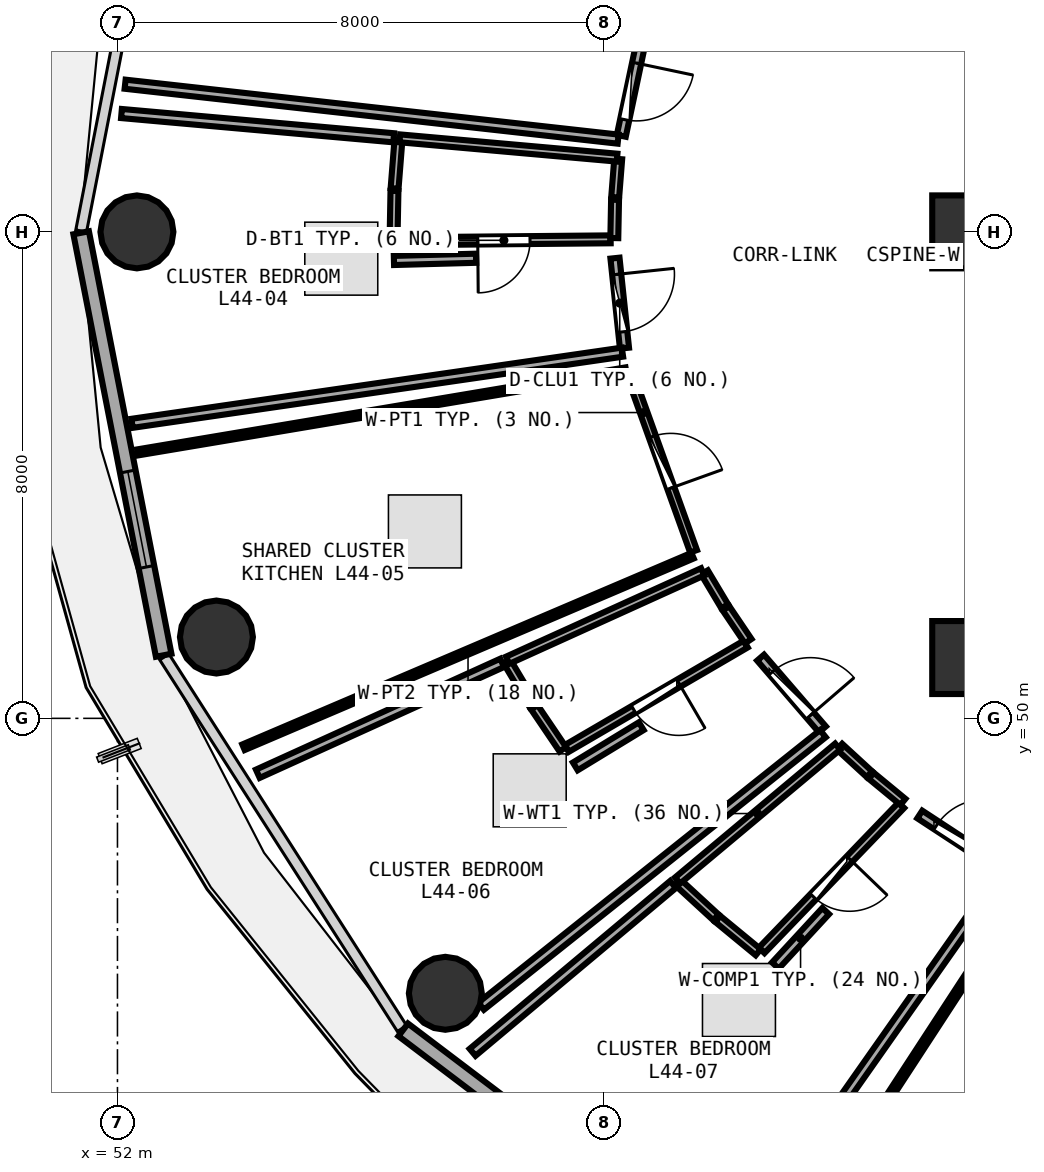
"""IFC4 building model, lengths in metres.
Left out: names, types, materials, properties, quantities, classifications, styles, units other than length and angle.
Written with IfcOpenShell. Run it as: python <this file> out.ifc"""

import sys

from ifc_helpers import new_model, si_unit, direction, frame, frame_2d, origin, origin_2d, place, context, subcontext, project, spatial, rectangle, circle, extrude, element, fill, save


model = new_model("IFC4")
c1 = context("Model", 3, precision=1e-05, world=origin(), true_north=direction((0.0, 1.0)))
c2 = subcontext(c1, "Body", "Model", "MODEL_VIEW")
j1 = project(units=[si_unit("LENGTHUNIT", "METRE"), si_unit("PLANEANGLEUNIT", "RADIAN")], contexts=[c1])
p1 = place(None, origin())
s1 = spatial("IfcSite", under=j1, at=p1, CompositionType="ELEMENT")
p2 = place(p1, origin())
s2 = spatial("IfcBuilding", under=s1, at=p2, CompositionType="ELEMENT")
p3 = place(p2, frame((0.0, 0.0, 173.1)))
s3 = spatial("IfcBuildingStorey", under=s2, at=p3, CompositionType="ELEMENT", Elevation=173.1)
for number, where, z_axis, x_axis in (
    (1, (66.0, 51.0, 0.0), (0.0, 0.0, 1.0), (1.0, 0.0, 0.0)),
    (2, (66.0, 58.0, 0.0), (0.0, 0.0, 1.0), (1.0, 0.0, 0.0)),
):
    element("IfcColumn", number, at=place(p3, frame(where, z_axis=z_axis, x_axis=x_axis)), inside=s3, PredefinedType="PILASTER", context=c2, shape_type="SweptSolid", body=[
        extrude(rectangle(XDim=1.2, YDim=1.2, at=origin_2d()), origin(), (0.0, 0.0, 1.0), 3.75),
    ])
for number, where, z_axis, x_axis in (
    (3, (52.32, 58.0, 0.0), (0.0, 0.0, 1.0), (1.0, 0.0, 0.0)),
    (4, (53.627, 51.337, 0.0), (0.0, 0.0, 1.0), (1.0, 0.0, 0.0)),
    (5, (57.392, 45.479, 0.0), (0.0, 0.0, 1.0), (1.0, 0.0, 0.0)),
):
    element("IfcColumn", number, at=place(p3, frame(where, z_axis=z_axis, x_axis=x_axis)), inside=s3, PredefinedType="COLUMN", context=c2, shape_type="SweptSolid", body=[
        extrude(circle(Radius=0.6, at=origin_2d()), origin(), (0.0, 0.0, 1.0), 3.75),
    ])
p4 = place(p3, frame((51.403, 57.985, 0.0), z_axis=(0.0, 0.0, 1.0), x_axis=(0.191716984769, -0.981450252306, 0.0)))
e6 = element("IfcWall", 6, at=p4, inside=s3, PredefinedType="SOLIDWALL", context=c2, shape_type="SweptSolid", body=[
    extrude(rectangle(XDim=7.079, YDim=0.26, at=frame_2d((3.54, 0.0))), origin(), (0.0, 0.0, 1.0), 3.475),
])
p5 = place(p4, frame((4.0, 0.0, 0.85)))
e7 = element("IfcOpeningElement", 7, at=p5, cuts=e6, PredefinedType="OPENING", context=c2, shape_type="SweptSolid", body=[
    extrude(rectangle(XDim=1.6, YDim=1.45, at=frame_2d((0.8, 0.725))), frame((0.0, 0.14, 0.0), z_axis=(0.0, -1.0, 0.0), x_axis=(1.0, 0.0, 0.0)), (0.0, 0.0, 1.0), 0.28),
])
p6 = place(p3, frame((56.699, 44.878, 0.0), z_axis=(0.0, 0.0, 1.0), x_axis=(0.797163719609, -0.603763202042, 0.0)))
e8 = element("IfcWall", 8, at=p6, inside=s3, PredefinedType="SOLIDWALL", context=c2, shape_type="SweptSolid", body=[
    extrude(rectangle(XDim=7.512, YDim=0.26, at=frame_2d((3.756, 0.0))), origin(), (0.0, 0.0, 1.0), 3.475),
])
p7 = place(p6, frame((2.956, 0.0, 0.85)))
e9 = element("IfcOpeningElement", 9, at=p7, cuts=e8, PredefinedType="OPENING", context=c2, shape_type="SweptSolid", body=[
    extrude(rectangle(XDim=1.6, YDim=1.45, at=frame_2d((0.8, 0.725))), frame((0.0, 0.14, 0.0), z_axis=(0.0, -1.0, 0.0), x_axis=(1.0, 0.0, 0.0)), (0.0, 0.0, 1.0), 0.28),
])
p8 = place(p3, frame((60.594, 61.041, 0.0), z_axis=(0.0, 0.0, 1.0), x_axis=(-0.206257580925, -0.978497731378, 0.0)))
e10 = element("IfcWall", 10, at=p8, inside=s3, PredefinedType="PARTITIONING", context=c2, shape_type="SweptSolid", body=[
    extrude(rectangle(XDim=1.494, YDim=0.15, at=frame_2d((0.747, 0.0))), origin(), (0.0, 0.0, 1.0), 3.48),
])
p9 = place(p8, frame((0.272, 0.0, 0.0)))
e11 = element("IfcOpeningElement", 11, at=p9, cuts=e10, PredefinedType="OPENING", context=c2, shape_type="SweptSolid", body=[
    extrude(rectangle(XDim=0.95, YDim=2.08, at=frame_2d((0.475, 1.04))), frame((0.0, 0.085, 0.0), z_axis=(0.0, -1.0, 0.0), x_axis=(1.0, 0.0, 0.0)), (0.0, 0.0, 1.0), 0.17),
])
p10 = place(p3, frame((60.111, 57.877, 0.0), z_axis=(0.0, 0.0, 1.0), x_axis=(-0.999958513443, -0.009108863449, 0.0)))
e12 = element("IfcWall", 12, at=p10, inside=s3, PredefinedType="PLUMBINGWALL", context=c2, shape_type="SweptSolid", body=[
    extrude(rectangle(XDim=3.511, YDim=0.13, at=frame_2d((1.756, 0.0))), origin(), (0.0, 0.0, 1.0), 2.975),
])
p11 = place(p10, frame((1.326, 0.0, 0.0)))
e13 = element("IfcOpeningElement", 13, at=p11, cuts=e12, PredefinedType="OPENING", context=c2, shape_type="SweptSolid", body=[
    extrude(rectangle(XDim=0.86, YDim=2.05, at=frame_2d((0.43, 1.025))), frame((0.0, 0.075, 0.0), z_axis=(0.0, -1.0, 0.0), x_axis=(1.0, 0.0, 0.0)), (0.0, 0.0, 1.0), 0.15),
])
p12 = place(p3, frame((60.182, 57.568, 0.0), z_axis=(0.0, 0.0, 1.0), x_axis=(0.104940843895, -0.994478465972, 0.0)))
e14 = element("IfcWall", 14, at=p12, inside=s3, PredefinedType="PARTITIONING", context=c2, shape_type="SweptSolid", body=[
    extrude(rectangle(XDim=1.489, YDim=0.15, at=frame_2d((0.745, 0.0))), origin(), (0.0, 0.0, 1.0), 3.48),
])
p13 = place(p12, frame((0.269, 0.0, 0.0)))
e15 = element("IfcOpeningElement", 15, at=p13, cuts=e14, PredefinedType="OPENING", context=c2, shape_type="SweptSolid", body=[
    extrude(rectangle(XDim=0.95, YDim=2.08, at=frame_2d((0.475, 1.04))), frame((0.0, 0.085, 0.0), z_axis=(0.0, -1.0, 0.0), x_axis=(1.0, 0.0, 0.0)), (0.0, 0.0, 1.0), 0.17),
])
p14 = place(p3, frame((60.423, 55.673, 0.0), z_axis=(0.0, 0.0, 1.0), x_axis=(0.338221551274, -0.941066513193, 0.0)))
e16 = element("IfcWall", 16, at=p14, inside=s3, PredefinedType="PARTITIONING", context=c2, shape_type="SweptSolid", body=[
    extrude(rectangle(XDim=3.108, YDim=0.12, at=frame_2d((1.554, 0.0))), origin(), (0.0, 0.0, 1.0), 3.235),
])
p15 = place(p14, frame((1.104, 0.0, 0.0)))
e17 = element("IfcOpeningElement", 17, at=p15, cuts=e16, PredefinedType="OPENING", context=c2, shape_type="SweptSolid", body=[
    extrude(rectangle(XDim=0.9, YDim=2.08, at=frame_2d((0.45, 1.04))), frame((0.0, 0.07, 0.0), z_axis=(0.0, -1.0, 0.0), x_axis=(1.0, 0.0, 0.0)), (0.0, 0.0, 1.0), 0.14),
])
p16 = place(p3, frame((62.333, 51.222, 0.0), z_axis=(0.0, 0.0, 1.0), x_axis=(-0.863869779697, -0.503715201008, 0.0)))
e18 = element("IfcWall", 18, at=p16, inside=s3, PredefinedType="PLUMBINGWALL", context=c2, shape_type="SweptSolid", body=[
    extrude(rectangle(XDim=3.41, YDim=0.13, at=frame_2d((1.705, 0.0))), origin(), (0.0, 0.0, 1.0), 2.975),
])
p17 = place(p16, frame((1.275, 0.0, 0.0)))
e19 = element("IfcOpeningElement", 19, at=p17, cuts=e18, PredefinedType="OPENING", context=c2, shape_type="SweptSolid", body=[
    extrude(rectangle(XDim=0.86, YDim=2.05, at=frame_2d((0.43, 1.025))), frame((0.0, 0.075, 0.0), z_axis=(0.0, -1.0, 0.0), x_axis=(1.0, 0.0, 0.0)), (0.0, 0.0, 1.0), 0.15),
])
p18 = place(p3, frame((62.577, 50.999, 0.0), z_axis=(0.0, 0.0, 1.0), x_axis=(0.652725635782, -0.757594379859, 0.0)))
e20 = element("IfcWall", 20, at=p18, inside=s3, PredefinedType="PARTITIONING", context=c2, shape_type="SweptSolid", body=[
    extrude(rectangle(XDim=1.557, YDim=0.15, at=frame_2d((0.779, 0.0))), origin(), (0.0, 0.0, 1.0), 2.975),
])
p19 = place(p18, frame((0.304, 0.0, 0.0)))
e21 = element("IfcOpeningElement", 21, at=p19, cuts=e20, PredefinedType="OPENING", context=c2, shape_type="SweptSolid", body=[
    extrude(rectangle(XDim=0.95, YDim=2.08, at=frame_2d((0.475, 1.04))), frame((0.0, 0.085, 0.0), z_axis=(0.0, -1.0, 0.0), x_axis=(1.0, 0.0, 0.0)), (0.0, 0.0, 1.0), 0.17),
])
p20 = place(p3, frame((64.891, 48.571, 0.0), z_axis=(0.0, 0.0, 1.0), x_axis=(-0.69341503006, -0.720538407086, 0.0)))
e22 = element("IfcWall", 22, at=p20, inside=s3, PredefinedType="PLUMBINGWALL", context=c2, shape_type="SweptSolid", body=[
    extrude(rectangle(XDim=3.312, YDim=0.13, at=frame_2d((1.656, 0.0))), origin(), (0.0, 0.0, 1.0), 3.175),
])
p21 = place(p20, frame((1.226, 0.0, 0.0)))
e23 = element("IfcOpeningElement", 23, at=p21, cuts=e22, PredefinedType="OPENING", context=c2, shape_type="SweptSolid", body=[
    extrude(rectangle(XDim=0.86, YDim=2.05, at=frame_2d((0.43, 1.025))), frame((0.0, 0.075, 0.0), z_axis=(0.0, -1.0, 0.0), x_axis=(1.0, 0.0, 0.0)), (0.0, 0.0, 1.0), 0.15),
])
p22 = place(p3, frame((65.195, 48.419, 0.0), z_axis=(0.0, 0.0, 1.0), x_axis=(0.836324272787, -0.548235087118, 0.0)))
e24 = element("IfcWall", 24, at=p22, inside=s3, PredefinedType="PARTITIONING", context=c2, shape_type="SweptSolid", body=[
    extrude(rectangle(XDim=1.608, YDim=0.15, at=frame_2d((0.804, 0.0))), origin(), (0.0, 0.0, 1.0), 2.975),
])
p23 = place(p22, frame((0.329, 0.0, 0.0)))
e25 = element("IfcOpeningElement", 25, at=p23, cuts=e24, PredefinedType="OPENING", context=c2, shape_type="SweptSolid", body=[
    extrude(rectangle(XDim=0.95, YDim=2.08, at=frame_2d((0.475, 1.04))), frame((0.0, 0.085, 0.0), z_axis=(0.0, -1.0, 0.0), x_axis=(1.0, 0.0, 0.0)), (0.0, 0.0, 1.0), 0.17),
])
p24 = place(p3, frame((63.351, 41.725, 0.0), z_axis=(0.0, 0.0, 1.0), x_axis=(0.546294843463, 0.837592946487, 0.0)))
e26 = element("IfcWall", 26, at=p24, inside=s3, PredefinedType="PARTITIONING", context=c2, shape_type="SweptSolid", body=[
    extrude(rectangle(XDim=6.604, YDim=0.1, at=frame_2d((3.302, 0.0))), origin(), (0.0, 0.0, 1.0), 2.975),
])
p25 = place(p3, frame((60.234, 59.525, 0.0), z_axis=(0.0, 0.0, 1.0), x_axis=(-0.99385157858, 0.110720548017, 0.0)))
e27 = element("IfcWall", 27, at=p25, inside=s3, PredefinedType="PARTITIONING", context=c2, shape_type="SweptSolid", body=[
    extrude(rectangle(XDim=8.158, YDim=0.15, at=frame_2d((4.079, 0.0))), origin(), (0.0, 0.0, 1.0), 3.025),
])
p26 = place(p3, frame((60.235, 59.199, 0.0), z_axis=(0.0, 0.0, 1.0), x_axis=(-0.078763069799, -0.996893363824, 0.0)))
e28 = element("IfcWall", 28, at=p26, inside=s3, PredefinedType="PLUMBINGWALL", context=c2, shape_type="SweptSolid", body=[
    extrude(rectangle(XDim=0.632, YDim=0.13, at=frame_2d((0.316, 0.0))), origin(), (0.0, 0.0, 1.0), 3.48),
])
p27 = place(p3, frame((60.184, 58.529, 0.0), z_axis=(0.0, 0.0, 1.0), x_axis=(-0.019338742534, -0.999812989032, 0.0)))
e29 = element("IfcWall", 29, at=p27, inside=s3, PredefinedType="PLUMBINGWALL", context=c2, shape_type="SweptSolid", body=[
    extrude(rectangle(XDim=0.631, YDim=0.13, at=frame_2d((0.315, 0.0))), origin(), (0.0, 0.0, 1.0), 2.975),
])
p28 = place(p3, frame((56.54, 57.865, 0.0), z_axis=(0.0, 0.0, 1.0), x_axis=(0.019006825377, 0.999819353978, 0.0)))
e30 = element("IfcWall", 30, at=p28, inside=s3, PredefinedType="PLUMBINGWALL", context=c2, shape_type="SweptSolid", body=[
    extrude(rectangle(XDim=0.809, YDim=0.13, at=frame_2d((0.405, 0.0))), origin(), (0.0, 0.0, 1.0), 2.975),
])
p29 = place(p3, frame((56.558, 58.714, 0.0), z_axis=(0.0, 0.0, 1.0), x_axis=(0.078797232985, 0.996890664052, 0.0)))
e31 = element("IfcWall", 31, at=p29, inside=s3, PredefinedType="PLUMBINGWALL", context=c2, shape_type="SweptSolid", body=[
    extrude(rectangle(XDim=0.809, YDim=0.13, at=frame_2d((0.404, 0.0))), origin(), (0.0, 0.0, 1.0), 3.48),
])
p30 = place(p3, frame((56.643, 59.538, 0.0), z_axis=(0.0, 0.0, 1.0), x_axis=(0.99608063721, -0.088449783359, 0.0)))
e32 = element("IfcWall", 32, at=p30, inside=s3, PredefinedType="PLUMBINGWALL", context=c2, shape_type="SweptSolid", body=[
    extrude(rectangle(XDim=3.588, YDim=0.13, at=frame_2d((1.794, 0.0))), origin(), (0.0, 0.0, 1.0), 3.175),
])
p31 = place(p3, frame((60.305, 56.022, 0.0), z_axis=(0.0, 0.0, 1.0), x_axis=(-0.989635565405, -0.143601698061, 0.0)))
e33 = element("IfcWall", 33, at=p31, inside=s3, PredefinedType="PARTITIONING", context=c2, shape_type="SweptSolid", body=[
    extrude(rectangle(XDim=8.15, YDim=0.15, at=frame_2d((4.075, 0.0))), origin(), (0.0, 0.0, 1.0), 3.025),
])
p32 = place(p3, frame((52.066, 59.947, 0.0), z_axis=(0.0, 0.0, 1.0), x_axis=(0.996054097512, -0.088748153952, 0.0)))
e34 = element("IfcWall", 34, at=p32, inside=s3, PredefinedType="PARTITIONING", context=c2, shape_type="SweptSolid", body=[
    extrude(rectangle(XDim=4.495, YDim=0.15, at=frame_2d((2.248, 0.0))), origin(), (0.0, 0.0, 1.0), 3.025),
])
p33 = place(p3, frame((56.547, 57.53, 0.0), z_axis=(0.0, 0.0, 1.0), x_axis=(0.999637471643, 0.026924436601, 0.0)))
e35 = element("IfcWall", 35, at=p33, inside=s3, PredefinedType="PARTITIONING", context=c2, shape_type="SweptSolid", body=[
    extrude(rectangle(XDim=1.351, YDim=0.15, at=frame_2d((0.676, 0.0))), origin(), (0.0, 0.0, 1.0), 3.175),
])
p34 = place(p3, frame((61.458, 52.675, 0.0), z_axis=(0.0, 0.0, 1.0), x_axis=(-0.919801141081, -0.392384837713, 0.0)))
e36 = element("IfcWall", 36, at=p34, inside=s3, PredefinedType="PARTITIONING", context=c2, shape_type="SweptSolid", body=[
    extrude(rectangle(XDim=8.03, YDim=0.1, at=frame_2d((4.015, 0.0))), origin(), (0.0, 0.0, 1.0), 2.975),
])
p35 = place(p3, frame((52.331, 54.374, 0.0), z_axis=(0.0, 0.0, 1.0), x_axis=(0.986190638786, 0.165614081438, 0.0)))
e37 = element("IfcWall", 37, at=p35, inside=s3, PredefinedType="PARTITIONING", context=c2, shape_type="SweptSolid", body=[
    extrude(rectangle(XDim=8.145, YDim=0.1, at=frame_2d((4.072, 0.0))), origin(), (0.0, 0.0, 1.0), 3.025),
])
p36 = place(p3, frame((61.653, 52.401, 0.0), z_axis=(0.0, 0.0, 1.0), x_axis=(0.513279564627, -0.858221468233, 0.0)))
e38 = element("IfcWall", 38, at=p36, inside=s3, PredefinedType="PLUMBINGWALL", context=c2, shape_type="SweptSolid", body=[
    extrude(rectangle(XDim=0.65, YDim=0.13, at=frame_2d((0.325, 0.0))), origin(), (0.0, 0.0, 1.0), 3.48),
])
p37 = place(p3, frame((62.008, 51.809, 0.0), z_axis=(0.0, 0.0, 1.0), x_axis=(0.559954578189, -0.828523307074, 0.0)))
e39 = element("IfcWall", 39, at=p37, inside=s3, PredefinedType="PLUMBINGWALL", context=c2, shape_type="SweptSolid", body=[
    extrude(rectangle(XDim=0.653, YDim=0.13, at=frame_2d((0.326, 0.0))), origin(), (0.0, 0.0, 1.0), 2.975),
])
p38 = place(p3, frame((59.325, 49.49, 0.0), z_axis=(0.0, 0.0, 1.0), x_axis=(-0.560686624686, 0.828028084607, 0.0)))
e40 = element("IfcWall", 40, at=p38, inside=s3, PredefinedType="PLUMBINGWALL", context=c2, shape_type="SweptSolid", body=[
    extrude(rectangle(XDim=0.836, YDim=0.13, at=frame_2d((0.418, 0.0))), origin(), (0.0, 0.0, 1.0), 3.48),
])
p39 = place(p3, frame((58.835, 50.216, 0.0), z_axis=(0.0, 0.0, 1.0), x_axis=(-0.512289710711, 0.858812699196, 0.0)))
e41 = element("IfcWall", 41, at=p39, inside=s3, PredefinedType="PLUMBINGWALL", context=c2, shape_type="SweptSolid", body=[
    extrude(rectangle(XDim=0.831, YDim=0.13, at=frame_2d((0.415, 0.0))), origin(), (0.0, 0.0, 1.0), 3.48),
])
p40 = place(p3, frame((58.417, 50.955, 0.0), z_axis=(0.0, 0.0, 1.0), x_axis=(0.910753048359, 0.412951431654, 0.0)))
e42 = element("IfcWall", 42, at=p40, inside=s3, PredefinedType="PLUMBINGWALL", context=c2, shape_type="SweptSolid", body=[
    extrude(rectangle(XDim=3.522, YDim=0.13, at=frame_2d((1.761, 0.0))), origin(), (0.0, 0.0, 1.0), 2.975),
])
p41 = place(p3, frame((63.602, 49.748, 0.0), z_axis=(0.0, 0.0, 1.0), x_axis=(-0.781921185322, -0.623377301435, 0.0)))
e43 = element("IfcWall", 43, at=p41, inside=s3, PredefinedType="PARTITIONING", context=c2, shape_type="SweptSolid", body=[
    extrude(rectangle(XDim=7.19, YDim=0.15, at=frame_2d((3.595, 0.0))), origin(), (0.0, 0.0, 1.0), 2.975),
])
p42 = place(p3, frame((54.308, 49.088, 0.0), z_axis=(0.0, 0.0, 1.0), x_axis=(0.910561522486, 0.413373576524, 0.0)))
e44 = element("IfcWall", 44, at=p42, inside=s3, PredefinedType="PARTITIONING", context=c2, shape_type="SweptSolid", body=[
    extrude(rectangle(XDim=4.413, YDim=0.15, at=frame_2d((2.207, 0.0))), origin(), (0.0, 0.0, 1.0), 3.025),
])
p43 = place(p3, frame((59.53, 49.21, 0.0), z_axis=(0.0, 0.0, 1.0), x_axis=(0.853704464487, 0.520757801012, 0.0)))
e45 = element("IfcWall", 45, at=p43, inside=s3, PredefinedType="PARTITIONING", context=c2, shape_type="SweptSolid", body=[
    extrude(rectangle(XDim=1.27, YDim=0.15, at=frame_2d((0.635, 0.0))), origin(), (0.0, 0.0, 1.0), 3.175),
])
p44 = place(p3, frame((63.875, 49.534, 0.0), z_axis=(0.0, 0.0, 1.0), x_axis=(0.736047371117, -0.676930031444, 0.0)))
e46 = element("IfcWall", 46, at=p44, inside=s3, PredefinedType="PLUMBINGWALL", context=c2, shape_type="SweptSolid", body=[
    extrude(rectangle(XDim=0.669, YDim=0.13, at=frame_2d((0.334, 0.0))), origin(), (0.0, 0.0, 1.0), 2.975),
])
p45 = place(p3, frame((64.397, 49.055, 0.0), z_axis=(0.0, 0.0, 1.0), x_axis=(0.771595512941, -0.636113483908, 0.0)))
e47 = element("IfcWall", 47, at=p45, inside=s3, PredefinedType="PLUMBINGWALL", context=c2, shape_type="SweptSolid", body=[
    extrude(rectangle(XDim=0.674, YDim=0.13, at=frame_2d((0.337, 0.0))), origin(), (0.0, 0.0, 1.0), 3.48),
])
p46 = place(p3, frame((62.538, 46.154, 0.0), z_axis=(0.0, 0.0, 1.0), x_axis=(-0.772085608201, 0.635518539154, 0.0)))
e48 = element("IfcWall", 48, at=p46, inside=s3, PredefinedType="PLUMBINGWALL", context=c2, shape_type="SweptSolid", body=[
    extrude(rectangle(XDim=0.862, YDim=0.13, at=frame_2d((0.431, 0.0))), origin(), (0.0, 0.0, 1.0), 3.175),
])
p47 = place(p3, frame((61.842, 46.728, 0.0), z_axis=(0.0, 0.0, 1.0), x_axis=(-0.735982119843, 0.67700097435, 0.0)))
e49 = element("IfcWall", 49, at=p47, inside=s3, PredefinedType="PLUMBINGWALL", context=c2, shape_type="SweptSolid", body=[
    extrude(rectangle(XDim=0.857, YDim=0.13, at=frame_2d((0.428, 0.0))), origin(), (0.0, 0.0, 1.0), 3.175),
])
p48 = place(p3, frame((61.212, 47.334, 0.0), z_axis=(0.0, 0.0, 1.0), x_axis=(0.767100423645, 0.641527037656, 0.0)))
e50 = element("IfcWall", 50, at=p48, inside=s3, PredefinedType="PLUMBINGWALL", context=c2, shape_type="SweptSolid", body=[
    extrude(rectangle(XDim=3.432, YDim=0.13, at=frame_2d((1.716, 0.0))), origin(), (0.0, 0.0, 1.0), 2.975),
])
p49 = place(p3, frame((66.567, 47.472, 0.0), z_axis=(0.0, 0.0, 1.0), x_axis=(-0.575029116879, -0.818132944417, 0.0)))
e51 = element("IfcWall", 51, at=p49, inside=s3, PredefinedType="PARTITIONING", context=c2, shape_type="SweptSolid", body=[
    extrude(rectangle(XDim=7.608, YDim=0.15, at=frame_2d((3.804, 0.0))), origin(), (0.0, 0.0, 1.0), 2.975),
])
p50 = place(p3, frame((57.841, 44.508, 0.0), z_axis=(0.0, 0.0, 1.0), x_axis=(0.766673820116, 0.642036800774, 0.0)))
e52 = element("IfcWall", 52, at=p50, inside=s3, PredefinedType="PARTITIONING", context=c2, shape_type="SweptSolid", body=[
    extrude(rectangle(XDim=4.3, YDim=0.15, at=frame_2d((2.15, 0.0))), origin(), (0.0, 0.0, 1.0), 3.025),
])
p51 = place(p3, frame((62.821, 45.935, 0.0), z_axis=(0.0, 0.0, 1.0), x_axis=(0.678404878428, 0.734688247439, 0.0)))
e53 = element("IfcWall", 53, at=p51, inside=s3, PredefinedType="PARTITIONING", context=c2, shape_type="SweptSolid", body=[
    extrude(rectangle(XDim=1.219, YDim=0.15, at=frame_2d((0.609, 0.0))), origin(), (0.0, 0.0, 1.0), 3.175),
])
p52 = place(p5, origin())
e54 = element("IfcWindow", 54, at=p52, inside=s3, PartitioningType="SINGLE_PANEL", PredefinedType="WINDOW", context=c2, shape_type="SweptSolid", body=[
    extrude(rectangle(XDim=1.6, YDim=1.45, at=frame_2d((0.8, 0.725))), frame((0.0, 0.03, 0.0), z_axis=(0.0, -1.0, 0.0), x_axis=(1.0, 0.0, 0.0)), (0.0, 0.0, 1.0), 0.06),
])
fill(e7, e54)
p53 = place(p9, origin())
e55 = element("IfcDoor", 55, at=p53, inside=s3, OperationType="SINGLE_SWING_LEFT", PredefinedType="DOOR", context=c2, shape_type="SweptSolid", body=[
    extrude(rectangle(XDim=0.95, YDim=2.08, at=frame_2d((0.475, 1.04))), frame((0.0, 0.025, 0.0), z_axis=(0.0, -1.0, 0.0), x_axis=(1.0, 0.0, 0.0)), (0.0, 0.0, 1.0), 0.05),
])
fill(e11, e55)
p54 = place(p11, origin())
e56 = element("IfcDoor", 56, at=p54, inside=s3, OperationType="SINGLE_SWING_RIGHT", PredefinedType="DOOR", context=c2, shape_type="SweptSolid", body=[
    extrude(rectangle(XDim=0.86, YDim=2.05, at=frame_2d((0.43, 1.025))), frame((0.0, 0.025, 0.0), z_axis=(0.0, -1.0, 0.0), x_axis=(1.0, 0.0, 0.0)), (0.0, 0.0, 1.0), 0.05),
])
fill(e13, e56)
p55 = place(p13, origin())
e57 = element("IfcDoor", 57, at=p55, inside=s3, OperationType="SINGLE_SWING_LEFT", PredefinedType="DOOR", context=c2, shape_type="SweptSolid", body=[
    extrude(rectangle(XDim=0.95, YDim=2.08, at=frame_2d((0.475, 1.04))), frame((0.0, 0.025, 0.0), z_axis=(0.0, -1.0, 0.0), x_axis=(1.0, 0.0, 0.0)), (0.0, 0.0, 1.0), 0.05),
])
fill(e15, e57)
p56 = place(p15, origin())
e58 = element("IfcDoor", 58, at=p56, inside=s3, OperationType="SINGLE_SWING_RIGHT", PredefinedType="DOOR", context=c2, shape_type="SweptSolid", body=[
    extrude(rectangle(XDim=0.9, YDim=2.08, at=frame_2d((0.45, 1.04))), frame((0.0, 0.025, 0.0), z_axis=(0.0, -1.0, 0.0), x_axis=(1.0, 0.0, 0.0)), (0.0, 0.0, 1.0), 0.05),
])
fill(e17, e58)
p57 = place(p17, origin())
e59 = element("IfcDoor", 59, at=p57, inside=s3, OperationType="SINGLE_SWING_LEFT", PredefinedType="DOOR", context=c2, shape_type="SweptSolid", body=[
    extrude(rectangle(XDim=0.86, YDim=2.05, at=frame_2d((0.43, 1.025))), frame((0.0, 0.025, 0.0), z_axis=(0.0, -1.0, 0.0), x_axis=(1.0, 0.0, 0.0)), (0.0, 0.0, 1.0), 0.05),
])
fill(e19, e59)
p58 = place(p19, origin())
e60 = element("IfcDoor", 60, at=p58, inside=s3, OperationType="SINGLE_SWING_RIGHT", PredefinedType="DOOR", context=c2, shape_type="SweptSolid", body=[
    extrude(rectangle(XDim=0.95, YDim=2.08, at=frame_2d((0.475, 1.04))), frame((0.0, 0.025, 0.0), z_axis=(0.0, -1.0, 0.0), x_axis=(1.0, 0.0, 0.0)), (0.0, 0.0, 1.0), 0.05),
])
fill(e21, e60)
p59 = place(p21, origin())
e61 = element("IfcDoor", 61, at=p59, inside=s3, OperationType="SINGLE_SWING_LEFT", PredefinedType="DOOR", context=c2, shape_type="SweptSolid", body=[
    extrude(rectangle(XDim=0.86, YDim=2.05, at=frame_2d((0.43, 1.025))), frame((0.0, 0.025, 0.0), z_axis=(0.0, -1.0, 0.0), x_axis=(1.0, 0.0, 0.0)), (0.0, 0.0, 1.0), 0.05),
])
fill(e23, e61)
p60 = place(p23, origin())
e62 = element("IfcDoor", 62, at=p60, inside=s3, OperationType="SINGLE_SWING_RIGHT", PredefinedType="DOOR", context=c2, shape_type="SweptSolid", body=[
    extrude(rectangle(XDim=0.95, YDim=2.08, at=frame_2d((0.475, 1.04))), frame((0.0, 0.025, 0.0), z_axis=(0.0, -1.0, 0.0), x_axis=(1.0, 0.0, 0.0)), (0.0, 0.0, 1.0), 0.05),
])
fill(e25, e62)
save(model, sys.argv[1])
